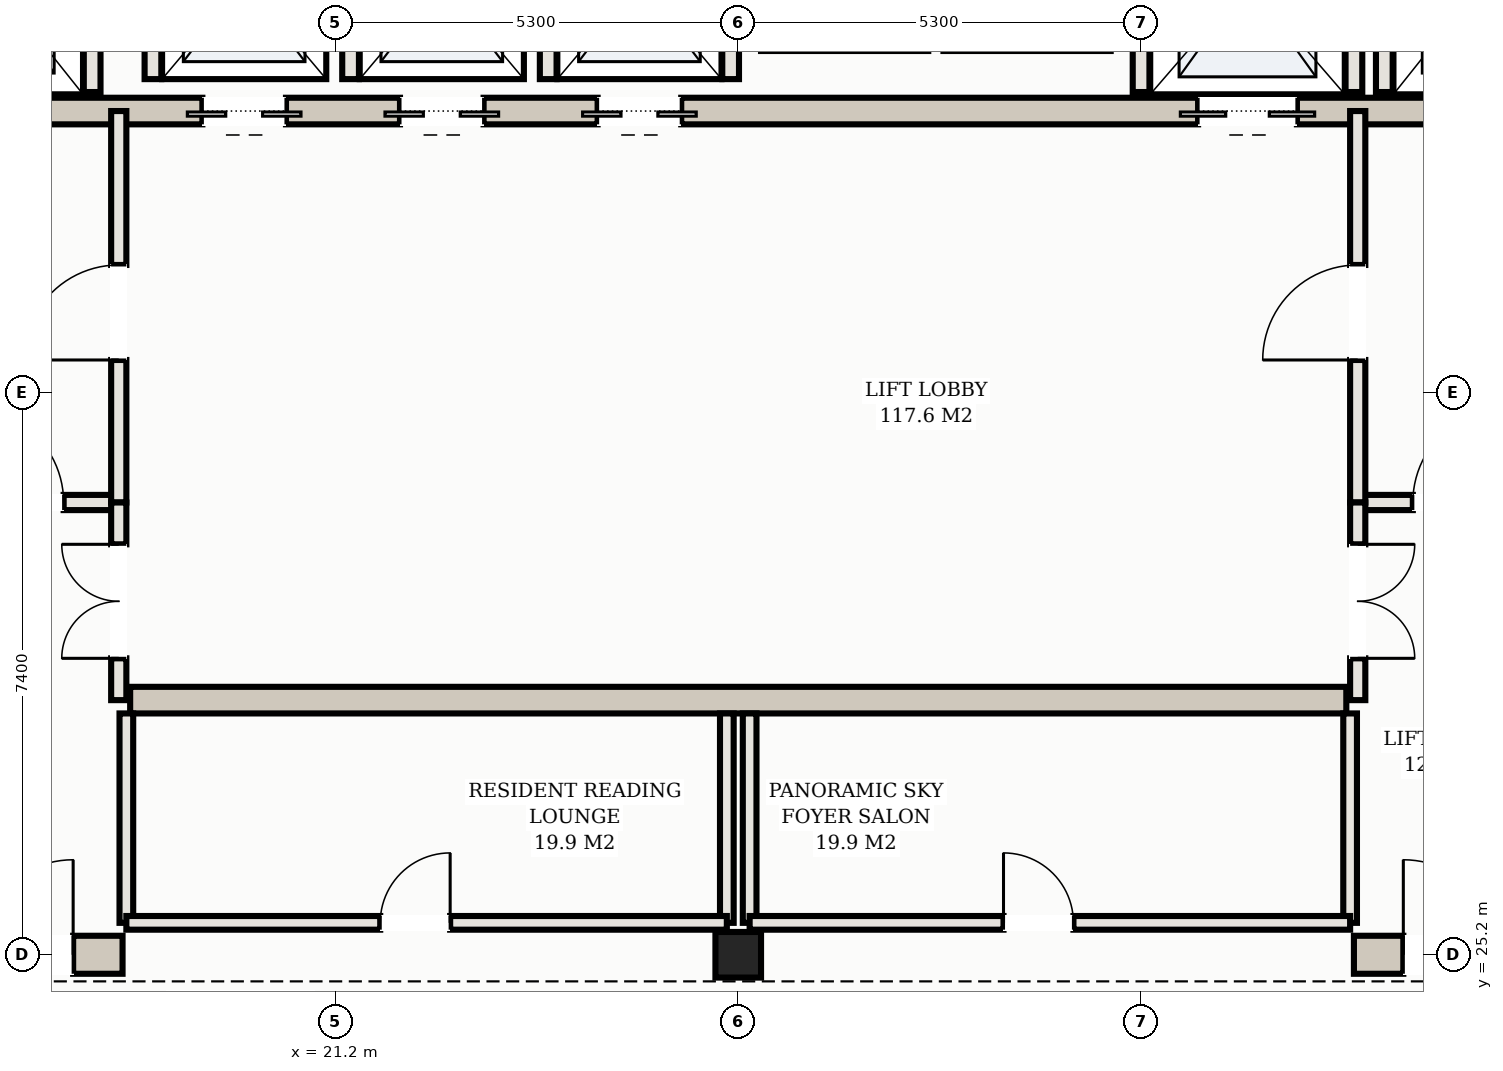
"""IFC4 building model, lengths in metres.
Left out: names, types, materials, properties, quantities, classifications, styles, units other than length and angle.
Written with IfcOpenShell. Run it as: python <this file> out.ifc"""

import sys

from ifc_helpers import new_model, si_unit, direction, frame, frame_2d, origin, origin_2d, place, context, subcontext, project, spatial, rectangle, hollow_rectangle, extrude, element, fill, save


model = new_model("IFC4")
c1 = context("Model", 3, precision=1e-05, world=origin(), true_north=direction((0.0, 1.0)))
c2 = subcontext(c1, "Body", "Model", "MODEL_VIEW")
j1 = project(units=[si_unit("LENGTHUNIT", "METRE"), si_unit("PLANEANGLEUNIT", "RADIAN")], contexts=[c1])
p1 = place(None, origin())
s1 = spatial("IfcSite", under=j1, at=p1, CompositionType="ELEMENT")
p2 = place(p1, origin())
s2 = spatial("IfcBuilding", under=s1, at=p2, CompositionType="ELEMENT")
p3 = place(p2, frame((0.0, 0.0, 259.4)))
s3 = spatial("IfcBuildingStorey", under=s2, at=p3, CompositionType="ELEMENT", Elevation=259.4)
p4 = place(p3, frame((10.35, 25.2, 0.0), z_axis=(0.0, 0.0, 1.0), x_axis=(1.0, 0.0, 0.0)))
e1 = element("IfcWall", 1, at=p4, inside=s3, PredefinedType="SHEAR", context=c2, shape_type="SweptSolid", body=[
    extrude(rectangle(XDim=8.05, YDim=0.5, at=frame_2d((4.025, 0.0))), origin(), (0.0, 0.0, 1.0), 3.11),
])
p5 = place(p4, frame((6.15, 0.0, 0.0)))
e2 = element("IfcOpeningElement", 2, at=p5, cuts=e1, PredefinedType="OPENING", context=c2, shape_type="SweptSolid", body=[
    extrude(rectangle(XDim=1.25, YDim=2.2, at=frame_2d((0.625, 1.1))), frame((0.0, 0.26, 0.0), z_axis=(0.0, -1.0, 0.0), x_axis=(1.0, 0.0, 0.0)), (0.0, 0.0, 1.0), 0.52),
])
p6 = place(p3, frame((34.6, 25.2, 0.0), z_axis=(0.0, 0.0, 1.0), x_axis=(1.0, 0.0, 0.0)))
e3 = element("IfcWall", 3, at=p6, inside=s3, PredefinedType="SHEAR", context=c2, shape_type="SweptSolid", body=[
    extrude(rectangle(XDim=8.05, YDim=0.5, at=frame_2d((4.025, 0.0))), origin(), (0.0, 0.0, 1.0), 3.11),
])
p7 = place(p6, frame((0.65, 0.0, 0.0)))
e4 = element("IfcOpeningElement", 4, at=p7, cuts=e3, PredefinedType="OPENING", context=c2, shape_type="SweptSolid", body=[
    extrude(rectangle(XDim=1.25, YDim=2.2, at=frame_2d((0.625, 1.1))), frame((0.0, 0.26, 0.0), z_axis=(0.0, -1.0, 0.0), x_axis=(1.0, 0.0, 0.0)), (0.0, 0.0, 1.0), 0.52),
])
p8 = place(p3, frame((15.5, 36.3, 0.0), z_axis=(0.0, 0.0, 1.0), x_axis=(1.0, 0.0, 0.0)))
e5 = element("IfcWall", 5, at=p8, inside=s3, PredefinedType="SHEAR", context=c2, shape_type="SweptSolid", body=[
    extrude(rectangle(XDim=22.0, YDim=0.35, at=frame_2d((11.0, 0.0))), origin(), (0.0, 0.0, 1.0), 3.11),
])
p9 = place(p8, frame((0.65, 0.0, 0.0)))
e6 = element("IfcOpeningElement", 6, at=p9, cuts=e5, PredefinedType="OPENING", context=c2, shape_type="SweptSolid", body=[
    extrude(rectangle(XDim=1.1, YDim=2.15, at=frame_2d((0.55, 1.075))), frame((0.0, 0.185, 0.0), z_axis=(0.0, -1.0, 0.0), x_axis=(1.0, 0.0, 0.0)), (0.0, 0.0, 1.0), 0.37),
])
p10 = place(p8, frame((20.25, 0.0, 0.0)))
e7 = element("IfcOpeningElement", 7, at=p10, cuts=e5, PredefinedType="OPENING", context=c2, shape_type="SweptSolid", body=[
    extrude(rectangle(XDim=1.1, YDim=2.15, at=frame_2d((0.55, 1.075))), frame((0.0, 0.185, 0.0), z_axis=(0.0, -1.0, 0.0), x_axis=(1.0, 0.0, 0.0)), (0.0, 0.0, 1.0), 0.37),
])
p11 = place(p8, frame((17.05, 0.0, 0.0)))
e8 = element("IfcOpeningElement", 8, at=p11, cuts=e5, PredefinedType="OPENING", context=c2, shape_type="SweptSolid", body=[
    extrude(rectangle(XDim=1.3, YDim=2.2, at=frame_2d((0.65, 1.1))), frame((0.0, 0.185, 0.0), z_axis=(0.0, -1.0, 0.0), x_axis=(1.0, 0.0, 0.0)), (0.0, 0.0, 1.0), 0.37),
])
p12 = place(p8, frame((3.95, 0.0, 0.0)))
e9 = element("IfcOpeningElement", 9, at=p12, cuts=e5, PredefinedType="OPENING", context=c2, shape_type="SweptSolid", body=[
    extrude(rectangle(XDim=1.1, YDim=2.15, at=frame_2d((0.55, 1.075))), frame((0.0, 0.185, 0.0), z_axis=(0.0, -1.0, 0.0), x_axis=(1.0, 0.0, 0.0)), (0.0, 0.0, 1.0), 0.37),
])
p13 = place(p8, frame((6.55, 0.0, 0.0)))
e10 = element("IfcOpeningElement", 10, at=p13, cuts=e5, PredefinedType="OPENING", context=c2, shape_type="SweptSolid", body=[
    extrude(rectangle(XDim=1.1, YDim=2.15, at=frame_2d((0.55, 1.075))), frame((0.0, 0.185, 0.0), z_axis=(0.0, -1.0, 0.0), x_axis=(1.0, 0.0, 0.0)), (0.0, 0.0, 1.0), 0.37),
])
p14 = place(p8, frame((9.15, 0.0, 0.0)))
e11 = element("IfcOpeningElement", 11, at=p14, cuts=e5, PredefinedType="OPENING", context=c2, shape_type="SweptSolid", body=[
    extrude(rectangle(XDim=1.1, YDim=2.15, at=frame_2d((0.55, 1.075))), frame((0.0, 0.185, 0.0), z_axis=(0.0, -1.0, 0.0), x_axis=(1.0, 0.0, 0.0)), (0.0, 0.0, 1.0), 0.37),
])
p15 = place(p3, frame((18.5, 28.55, 0.0), z_axis=(0.0, 0.0, 1.0), x_axis=(1.0, 0.0, 0.0)))
e12 = element("IfcWall", 12, at=p15, inside=s3, PredefinedType="SHEAR", context=c2, shape_type="SweptSolid", body=[
    extrude(rectangle(XDim=16.0, YDim=0.35, at=frame_2d((8.0, 0.0))), origin(), (0.0, 0.0, 1.0), 3.11),
])
p16 = place(p3, frame((26.5, 25.2, 0.0), z_axis=(0.0, 0.0, 1.0), x_axis=(1.0, 0.0, 0.0)))
e13 = element("IfcColumn", 13, at=p16, inside=s3, PredefinedType="COLUMN", context=c2, shape_type="SweptSolid", body=[
    extrude(hollow_rectangle(XDim=0.6, YDim=0.6, WallThickness=0.022, at=origin_2d()), origin(), (0.0, 0.0, 1.0), 3.3),
])
for number, where, z_axis, x_axis in (
    (14, (18.0, 36.55, 0.0), (0.0, 0.0, 1.0), (0.0, 1.0, 0.0)),
    (15, (35.0, 36.55, 0.0), (0.0, 0.0, 1.0), (0.0, 1.0, 0.0)),
    (16, (31.8, 36.55, 0.0), (0.0, 0.0, 1.0), (0.0, 1.0, 0.0)),
    (17, (34.6, 36.55, 0.0), (0.0, 0.0, 1.0), (0.0, 1.0, 0.0)),
):
    element("IfcWall", number, at=place(p3, frame(where, z_axis=z_axis, x_axis=x_axis)), inside=s3, PredefinedType="SOLIDWALL", context=c2, shape_type="SweptSolid", body=[
        extrude(rectangle(XDim=2.93, YDim=0.22, at=frame_2d((1.465, 0.0))), origin(), (0.0, 0.0, 1.0), 3.11),
    ])
for number, where, z_axis, x_axis in (
    (18, (18.8, 36.72, 0.0), (0.0, 0.0, 1.0), (0.0, 1.0, 0.0)),
    (19, (21.4, 36.72, 0.0), (0.0, 0.0, 1.0), (0.0, 1.0, 0.0)),
    (20, (24.0, 36.72, 0.0), (0.0, 0.0, 1.0), (0.0, 1.0, 0.0)),
    (21, (26.4, 36.72, 0.0), (0.0, 0.0, 1.0), (0.0, 1.0, 0.0)),
):
    element("IfcWall", number, at=place(p3, frame(where, z_axis=z_axis, x_axis=x_axis)), inside=s3, PredefinedType="SOLIDWALL", context=c2, shape_type="SweptSolid", body=[
        extrude(rectangle(XDim=2.56, YDim=0.22, at=frame_2d((1.28, 0.0))), origin(), (0.0, 0.0, 1.0), 3.11),
    ])
p17 = place(p3, frame((15.1, 31.15, 0.0), z_axis=(0.0, 0.0, 1.0), x_axis=(1.0, 0.0, 0.0)))
e22 = element("IfcWall", 22, at=p17, inside=s3, PredefinedType="PARTITIONING", context=c2, shape_type="SweptSolid", body=[
    extrude(rectangle(XDim=3.25, YDim=0.2, at=frame_2d((1.625, 0.0))), origin(), (0.0, 0.0, 1.0), 2.45),
])
p18 = place(p17, frame((1.275, 0.0, 0.0)))
e23 = element("IfcOpeningElement", 23, at=p18, cuts=e22, PredefinedType="OPENING", context=c2, shape_type="SweptSolid", body=[
    extrude(rectangle(XDim=1.25, YDim=2.2, at=frame_2d((0.625, 1.1))), frame((0.0, 0.11, 0.0), z_axis=(0.0, -1.0, 0.0), x_axis=(1.0, 0.0, 0.0)), (0.0, 0.0, 1.0), 0.22),
])
p19 = place(p3, frame((18.35, 31.15, 0.0), z_axis=(0.0, 0.0, 1.0), x_axis=(0.0, 1.0, 0.0)))
e24 = element("IfcWall", 24, at=p19, inside=s3, PredefinedType="PARTITIONING", context=c2, shape_type="SweptSolid", body=[
    extrude(rectangle(XDim=5.15, YDim=0.2, at=frame_2d((2.575, 0.0))), origin(), (0.0, 0.0, 1.0), 2.45),
])
p20 = place(p19, frame((1.875, 0.0, 0.0)))
e25 = element("IfcOpeningElement", 25, at=p20, cuts=e24, PredefinedType="OPENING", context=c2, shape_type="SweptSolid", body=[
    extrude(rectangle(XDim=1.25, YDim=2.2, at=frame_2d((0.625, 1.1))), frame((0.0, 0.11, 0.0), z_axis=(0.0, -1.0, 0.0), x_axis=(1.0, 0.0, 0.0)), (0.0, 0.0, 1.0), 0.22),
])
p21 = place(p3, frame((34.65, 31.15, 0.0), z_axis=(0.0, 0.0, 1.0), x_axis=(1.0, 0.0, 0.0)))
e26 = element("IfcWall", 26, at=p21, inside=s3, PredefinedType="PARTITIONING", context=c2, shape_type="SweptSolid", body=[
    extrude(rectangle(XDim=3.25, YDim=0.2, at=frame_2d((1.625, 0.0))), origin(), (0.0, 0.0, 1.0), 2.45),
])
p22 = place(p21, frame((0.725, 0.0, 0.0)))
e27 = element("IfcOpeningElement", 27, at=p22, cuts=e26, PredefinedType="OPENING", context=c2, shape_type="SweptSolid", body=[
    extrude(rectangle(XDim=1.25, YDim=2.2, at=frame_2d((0.625, 1.1))), frame((0.0, 0.11, 0.0), z_axis=(0.0, -1.0, 0.0), x_axis=(1.0, 0.0, 0.0)), (0.0, 0.0, 1.0), 0.22),
])
p23 = place(p3, frame((34.65, 31.15, 0.0), z_axis=(0.0, 0.0, 1.0), x_axis=(0.0, 1.0, 0.0)))
e28 = element("IfcWall", 28, at=p23, inside=s3, PredefinedType="PARTITIONING", context=c2, shape_type="SweptSolid", body=[
    extrude(rectangle(XDim=5.15, YDim=0.2, at=frame_2d((2.575, 0.0))), origin(), (0.0, 0.0, 1.0), 2.45),
])
p24 = place(p23, frame((1.875, 0.0, 0.0)))
e29 = element("IfcOpeningElement", 29, at=p24, cuts=e28, PredefinedType="OPENING", context=c2, shape_type="SweptSolid", body=[
    extrude(rectangle(XDim=1.25, YDim=2.2, at=frame_2d((0.625, 1.1))), frame((0.0, 0.11, 0.0), z_axis=(0.0, -1.0, 0.0), x_axis=(1.0, 0.0, 0.0)), (0.0, 0.0, 1.0), 0.22),
])
p25 = place(p3, frame((18.35, 28.55, 0.0), z_axis=(0.0, 0.0, 1.0), x_axis=(0.0, 1.0, 0.0)))
e30 = element("IfcWall", 30, at=p25, inside=s3, PredefinedType="PARTITIONING", context=c2, shape_type="SweptSolid", body=[
    extrude(rectangle(XDim=2.6, YDim=0.2, at=frame_2d((1.3, 0.0))), origin(), (0.0, 0.0, 1.0), 2.45),
])
p26 = place(p25, frame((0.55, 0.0, 0.0)))
e31 = element("IfcOpeningElement", 31, at=p26, cuts=e30, PredefinedType="OPENING", context=c2, shape_type="SweptSolid", body=[
    extrude(rectangle(XDim=1.5, YDim=2.25, at=frame_2d((0.75, 1.125))), frame((0.0, 0.11, 0.0), z_axis=(0.0, -1.0, 0.0), x_axis=(1.0, 0.0, 0.0)), (0.0, 0.0, 1.0), 0.22),
])
p27 = place(p3, frame((34.65, 28.55, 0.0), z_axis=(0.0, 0.0, 1.0), x_axis=(0.0, 1.0, 0.0)))
e32 = element("IfcWall", 32, at=p27, inside=s3, PredefinedType="PARTITIONING", context=c2, shape_type="SweptSolid", body=[
    extrude(rectangle(XDim=2.6, YDim=0.2, at=frame_2d((1.3, 0.0))), origin(), (0.0, 0.0, 1.0), 2.45),
])
p28 = place(p27, frame((0.55, 0.0, 0.0)))
e33 = element("IfcOpeningElement", 33, at=p28, cuts=e32, PredefinedType="OPENING", context=c2, shape_type="SweptSolid", body=[
    extrude(rectangle(XDim=1.5, YDim=2.25, at=frame_2d((0.75, 1.125))), frame((0.0, 0.11, 0.0), z_axis=(0.0, -1.0, 0.0), x_axis=(1.0, 0.0, 0.0)), (0.0, 0.0, 1.0), 0.22),
])
for number, where, z_axis, x_axis in (
    (34, (18.45, 25.62, 0.0), (0.0, 0.0, 1.0), (0.0, 1.0, 0.0)),
    (35, (26.35, 25.62, 0.0), (0.0, 0.0, 1.0), (0.0, 1.0, 0.0)),
):
    element("IfcWall", number, at=place(p3, frame(where, z_axis=z_axis, x_axis=x_axis)), inside=s3, PredefinedType="PARTITIONING", context=c2, shape_type="SweptSolid", body=[
        extrude(rectangle(XDim=2.755, YDim=0.18, at=frame_2d((1.377, 0.0))), origin(), (0.0, 0.0, 1.0), 2.45),
    ])
p29 = place(p3, frame((18.45, 25.62, 0.0), z_axis=(0.0, 0.0, 1.0), x_axis=(1.0, 0.0, 0.0)))
e36 = element("IfcWall", 36, at=p29, inside=s3, PredefinedType="PARTITIONING", context=c2, shape_type="SweptSolid", body=[
    extrude(rectangle(XDim=7.9, YDim=0.18, at=frame_2d((3.95, 0.0))), origin(), (0.0, 0.0, 1.0), 2.45),
])
p30 = place(p29, frame((3.34, 0.0, 0.0)))
e37 = element("IfcOpeningElement", 37, at=p30, cuts=e36, PredefinedType="OPENING", context=c2, shape_type="SweptSolid", body=[
    extrude(rectangle(XDim=0.92, YDim=2.15, at=frame_2d((0.46, 1.075))), frame((0.0, 0.1, 0.0), z_axis=(0.0, -1.0, 0.0), x_axis=(1.0, 0.0, 0.0)), (0.0, 0.0, 1.0), 0.2),
])
for number, where, z_axis, x_axis in (
    (38, (26.65, 25.62, 0.0), (0.0, 0.0, 1.0), (0.0, 1.0, 0.0)),
    (39, (34.55, 25.62, 0.0), (0.0, 0.0, 1.0), (0.0, 1.0, 0.0)),
):
    element("IfcWall", number, at=place(p3, frame(where, z_axis=z_axis, x_axis=x_axis)), inside=s3, PredefinedType="PARTITIONING", context=c2, shape_type="SweptSolid", body=[
        extrude(rectangle(XDim=2.755, YDim=0.18, at=frame_2d((1.377, 0.0))), origin(), (0.0, 0.0, 1.0), 2.45),
    ])
p31 = place(p3, frame((26.65, 25.62, 0.0), z_axis=(0.0, 0.0, 1.0), x_axis=(1.0, 0.0, 0.0)))
e40 = element("IfcWall", 40, at=p31, inside=s3, PredefinedType="PARTITIONING", context=c2, shape_type="SweptSolid", body=[
    extrude(rectangle(XDim=7.9, YDim=0.18, at=frame_2d((3.95, 0.0))), origin(), (0.0, 0.0, 1.0), 2.45),
])
p32 = place(p31, frame((3.34, 0.0, 0.0)))
e41 = element("IfcOpeningElement", 41, at=p32, cuts=e40, PredefinedType="OPENING", context=c2, shape_type="SweptSolid", body=[
    extrude(rectangle(XDim=0.92, YDim=2.15, at=frame_2d((0.46, 1.075))), frame((0.0, 0.1, 0.0), z_axis=(0.0, -1.0, 0.0), x_axis=(1.0, 0.0, 0.0)), (0.0, 0.0, 1.0), 0.2),
])
p33 = place(p11, frame((1.3, 0.0, 0.0), z_axis=(0.0, 0.0, 1.0), x_axis=(-1.0, 0.0, 0.0)))
e42 = element("IfcDoor", 42, at=p33, inside=s3, OperationType="DOUBLE_DOOR_SLIDING", PredefinedType="DOOR", context=c2, shape_type="SweptSolid", body=[
    extrude(rectangle(XDim=1.3, YDim=2.2, at=frame_2d((0.65, 1.1))), frame((0.0, 0.025, 0.0), z_axis=(0.0, -1.0, 0.0), x_axis=(1.0, 0.0, 0.0)), (0.0, 0.0, 1.0), 0.05),
])
fill(e8, e42)
p34 = place(p12, frame((1.1, 0.0, 0.0), z_axis=(0.0, 0.0, 1.0), x_axis=(-1.0, 0.0, 0.0)))
e43 = element("IfcDoor", 43, at=p34, inside=s3, OperationType="DOUBLE_DOOR_SLIDING", PredefinedType="DOOR", context=c2, shape_type="SweptSolid", body=[
    extrude(rectangle(XDim=1.1, YDim=2.15, at=frame_2d((0.55, 1.075))), frame((0.0, 0.025, 0.0), z_axis=(0.0, -1.0, 0.0), x_axis=(1.0, 0.0, 0.0)), (0.0, 0.0, 1.0), 0.05),
])
fill(e9, e43)
p35 = place(p13, frame((1.1, 0.0, 0.0), z_axis=(0.0, 0.0, 1.0), x_axis=(-1.0, 0.0, 0.0)))
e44 = element("IfcDoor", 44, at=p35, inside=s3, OperationType="DOUBLE_DOOR_SLIDING", PredefinedType="DOOR", context=c2, shape_type="SweptSolid", body=[
    extrude(rectangle(XDim=1.1, YDim=2.15, at=frame_2d((0.55, 1.075))), frame((0.0, 0.025, 0.0), z_axis=(0.0, -1.0, 0.0), x_axis=(1.0, 0.0, 0.0)), (0.0, 0.0, 1.0), 0.05),
])
fill(e10, e44)
p36 = place(p14, frame((1.1, 0.0, 0.0), z_axis=(0.0, 0.0, 1.0), x_axis=(-1.0, 0.0, 0.0)))
e45 = element("IfcDoor", 45, at=p36, inside=s3, OperationType="DOUBLE_DOOR_SLIDING", PredefinedType="DOOR", context=c2, shape_type="SweptSolid", body=[
    extrude(rectangle(XDim=1.1, YDim=2.15, at=frame_2d((0.55, 1.075))), frame((0.0, 0.025, 0.0), z_axis=(0.0, -1.0, 0.0), x_axis=(1.0, 0.0, 0.0)), (0.0, 0.0, 1.0), 0.05),
])
fill(e11, e45)
p37 = place(p5, origin())
e46 = element("IfcDoor", 46, at=p37, inside=s3, OperationType="SINGLE_SWING_RIGHT", PredefinedType="DOOR", context=c2, shape_type="SweptSolid", body=[
    extrude(rectangle(XDim=1.25, YDim=2.2, at=frame_2d((0.625, 1.1))), frame((0.0, 0.025, 0.0), z_axis=(0.0, -1.0, 0.0), x_axis=(1.0, 0.0, 0.0)), (0.0, 0.0, 1.0), 0.05),
])
fill(e2, e46)
p38 = place(p7, origin())
e47 = element("IfcDoor", 47, at=p38, inside=s3, OperationType="SINGLE_SWING_LEFT", PredefinedType="DOOR", context=c2, shape_type="SweptSolid", body=[
    extrude(rectangle(XDim=1.25, YDim=2.2, at=frame_2d((0.625, 1.1))), frame((0.0, 0.025, 0.0), z_axis=(0.0, -1.0, 0.0), x_axis=(1.0, 0.0, 0.0)), (0.0, 0.0, 1.0), 0.05),
])
fill(e4, e47)
p39 = place(p18, origin())
e48 = element("IfcDoor", 48, at=p39, inside=s3, OperationType="SINGLE_SWING_LEFT", PredefinedType="DOOR", context=c2, shape_type="SweptSolid", body=[
    extrude(rectangle(XDim=1.25, YDim=2.2, at=frame_2d((0.625, 1.1))), frame((0.0, 0.025, 0.0), z_axis=(0.0, -1.0, 0.0), x_axis=(1.0, 0.0, 0.0)), (0.0, 0.0, 1.0), 0.05),
])
fill(e23, e48)
p40 = place(p20, origin())
e49 = element("IfcDoor", 49, at=p40, inside=s3, OperationType="SINGLE_SWING_LEFT", PredefinedType="DOOR", context=c2, shape_type="SweptSolid", body=[
    extrude(rectangle(XDim=1.25, YDim=2.2, at=frame_2d((0.625, 1.1))), frame((0.0, 0.025, 0.0), z_axis=(0.0, -1.0, 0.0), x_axis=(1.0, 0.0, 0.0)), (0.0, 0.0, 1.0), 0.05),
])
fill(e25, e49)
p41 = place(p22, origin())
e50 = element("IfcDoor", 50, at=p41, inside=s3, OperationType="SINGLE_SWING_RIGHT", PredefinedType="DOOR", context=c2, shape_type="SweptSolid", body=[
    extrude(rectangle(XDim=1.25, YDim=2.2, at=frame_2d((0.625, 1.1))), frame((0.0, 0.025, 0.0), z_axis=(0.0, -1.0, 0.0), x_axis=(1.0, 0.0, 0.0)), (0.0, 0.0, 1.0), 0.05),
])
fill(e27, e50)
p42 = place(p24, origin())
e51 = element("IfcDoor", 51, at=p42, inside=s3, OperationType="SINGLE_SWING_LEFT", PredefinedType="DOOR", context=c2, shape_type="SweptSolid", body=[
    extrude(rectangle(XDim=1.25, YDim=2.2, at=frame_2d((0.625, 1.1))), frame((0.0, 0.025, 0.0), z_axis=(0.0, -1.0, 0.0), x_axis=(1.0, 0.0, 0.0)), (0.0, 0.0, 1.0), 0.05),
])
fill(e29, e51)
p43 = place(p26, origin())
e52 = element("IfcDoor", 52, at=p43, inside=s3, OperationType="DOUBLE_DOOR_SINGLE_SWING", PredefinedType="DOOR", context=c2, shape_type="SweptSolid", body=[
    extrude(rectangle(XDim=1.5, YDim=2.25, at=frame_2d((0.75, 1.125))), frame((0.0, 0.025, 0.0), z_axis=(0.0, -1.0, 0.0), x_axis=(1.0, 0.0, 0.0)), (0.0, 0.0, 1.0), 0.05),
])
fill(e31, e52)
p44 = place(p28, frame((1.5, 0.0, 0.0), z_axis=(0.0, 0.0, 1.0), x_axis=(-1.0, 0.0, 0.0)))
e53 = element("IfcDoor", 53, at=p44, inside=s3, OperationType="DOUBLE_DOOR_SINGLE_SWING", PredefinedType="DOOR", context=c2, shape_type="SweptSolid", body=[
    extrude(rectangle(XDim=1.5, YDim=2.25, at=frame_2d((0.75, 1.125))), frame((0.0, 0.025, 0.0), z_axis=(0.0, -1.0, 0.0), x_axis=(1.0, 0.0, 0.0)), (0.0, 0.0, 1.0), 0.05),
])
fill(e33, e53)
p45 = place(p30, origin())
e54 = element("IfcDoor", 54, at=p45, inside=s3, OperationType="SINGLE_SWING_RIGHT", PredefinedType="DOOR", context=c2, shape_type="SweptSolid", body=[
    extrude(rectangle(XDim=0.92, YDim=2.15, at=frame_2d((0.46, 1.075))), frame((0.0, 0.025, 0.0), z_axis=(0.0, -1.0, 0.0), x_axis=(1.0, 0.0, 0.0)), (0.0, 0.0, 1.0), 0.05),
])
fill(e37, e54)
p46 = place(p32, origin())
e55 = element("IfcDoor", 55, at=p46, inside=s3, OperationType="SINGLE_SWING_LEFT", PredefinedType="DOOR", context=c2, shape_type="SweptSolid", body=[
    extrude(rectangle(XDim=0.92, YDim=2.15, at=frame_2d((0.46, 1.075))), frame((0.0, 0.025, 0.0), z_axis=(0.0, -1.0, 0.0), x_axis=(1.0, 0.0, 0.0)), (0.0, 0.0, 1.0), 0.05),
])
fill(e41, e55)
save(model, sys.argv[1])
